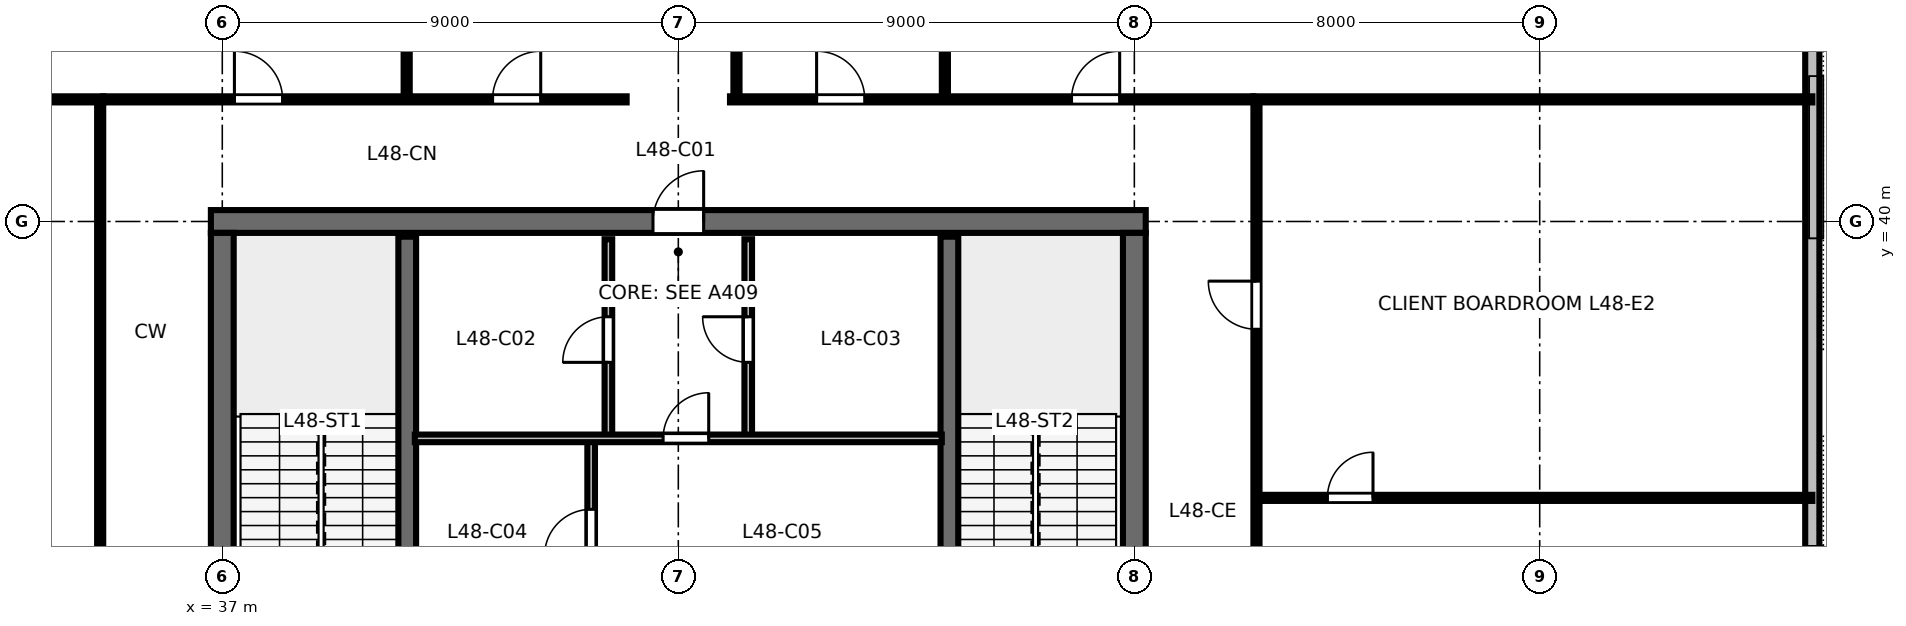
"""IFC4 building model, lengths in metres.
Left out: names, types, materials, properties, quantities, classifications, styles, units other than length and angle.
Written with IfcOpenShell. Run it as: python <this file> out.ifc"""

import sys

from ifc_helpers import new_model, si_unit, direction, frame, frame_2d, origin, place, context, subcontext, project, spatial, rectangle, extrude, element, fill, save


model = new_model("IFC4")
c1 = context("Model", 3, precision=1e-05, world=origin(), true_north=direction((0.0, 1.0)))
c2 = subcontext(c1, "Body", "Model", "MODEL_VIEW")
j1 = project(units=[si_unit("LENGTHUNIT", "METRE"), si_unit("PLANEANGLEUNIT", "RADIAN")], contexts=[c1])
p1 = place(None, origin())
s1 = spatial("IfcSite", under=j1, at=p1, CompositionType="ELEMENT")
p2 = place(p1, origin())
s2 = spatial("IfcBuilding", under=s1, at=p2, CompositionType="ELEMENT")
p3 = place(p2, frame((0.0, 0.0, 184.2)))
s3 = spatial("IfcBuildingStorey", under=s2, at=p3, CompositionType="ELEMENT", Elevation=184.2)
p4 = place(p3, frame((36.775, 40.0, 0.0), z_axis=(0.0, 0.0, 1.0), x_axis=(1.0, 0.0, 0.0)))
e1 = element("IfcWall", 1, at=p4, inside=s3, PredefinedType="SHEAR", context=c2, shape_type="SweptSolid", body=[
    extrude(rectangle(XDim=18.45, YDim=0.45, at=frame_2d((9.225, 0.0))), origin(), (0.0, 0.0, 1.0), 3.36),
])
p5 = place(p4, frame((8.725, 0.0, 0.0)))
e2 = element("IfcOpeningElement", 2, at=p5, cuts=e1, PredefinedType="OPENING", context=c2, shape_type="SweptSolid", body=[
    extrude(rectangle(XDim=1.0, YDim=2.15, at=frame_2d((0.5, 1.075))), frame((0.0, 0.235, 0.0), z_axis=(0.0, -1.0, 0.0), x_axis=(1.0, 0.0, 0.0)), (0.0, 0.0, 1.0), 0.47),
])
p6 = place(p3, frame((37.0, 24.225, 0.0), z_axis=(0.0, 0.0, 1.0), x_axis=(0.0, 1.0, 0.0)))
e3 = element("IfcWall", 3, at=p6, inside=s3, PredefinedType="SHEAR", context=c2, shape_type="SweptSolid", body=[
    extrude(rectangle(XDim=15.55, YDim=0.45, at=frame_2d((7.775, 0.0))), origin(), (0.0, 0.0, 1.0), 3.36),
])
p7 = place(p6, frame((5.3, 0.0, 0.0)))
e4 = element("IfcOpeningElement", 4, at=p7, cuts=e3, PredefinedType="OPENING", context=c2, shape_type="SweptSolid", body=[
    extrude(rectangle(XDim=1.15, YDim=2.15, at=frame_2d((0.575, 1.075))), frame((0.0, 0.235, 0.0), z_axis=(0.0, -1.0, 0.0), x_axis=(1.0, 0.0, 0.0)), (0.0, 0.0, 1.0), 0.47),
])
p8 = place(p3, frame((55.0, 24.225, 0.0), z_axis=(0.0, 0.0, 1.0), x_axis=(0.0, 1.0, 0.0)))
e5 = element("IfcWall", 5, at=p8, inside=s3, PredefinedType="SHEAR", context=c2, shape_type="SweptSolid", body=[
    extrude(rectangle(XDim=15.55, YDim=0.45, at=frame_2d((7.775, 0.0))), origin(), (0.0, 0.0, 1.0), 3.36),
])
p9 = place(p8, frame((5.3, 0.0, 0.0)))
e6 = element("IfcOpeningElement", 6, at=p9, cuts=e5, PredefinedType="OPENING", context=c2, shape_type="SweptSolid", body=[
    extrude(rectangle(XDim=1.15, YDim=2.15, at=frame_2d((0.575, 1.075))), frame((0.0, 0.235, 0.0), z_axis=(0.0, -1.0, 0.0), x_axis=(1.0, 0.0, 0.0)), (0.0, 0.0, 1.0), 0.47),
])
p10 = place(p3, frame((68.38, 17.2, 0.0), z_axis=(0.0, 0.0, 1.0), x_axis=(0.0, 1.0, 0.0)))
e7 = element("IfcWall", 7, at=p10, inside=s3, PredefinedType="STANDARD", context=c2, shape_type="SweptSolid", body=[
    extrude(rectangle(XDim=29.6, YDim=0.28, at=frame_2d((14.8, 0.0))), origin(), (0.0, 0.0, 1.0), 2.817),
])
for number, where, z_axis, x_axis in (
    (8, (40.65, 32.0, 0.0), (0.0, 0.0, 1.0), (0.0, 1.0, 0.0)),
    (9, (51.35, 32.0, 0.0), (0.0, 0.0, 1.0), (0.0, 1.0, 0.0)),
):
    element("IfcWall", number, at=place(p3, frame(where, z_axis=z_axis, x_axis=x_axis)), inside=s3, PredefinedType="SHEAR", context=c2, shape_type="SweptSolid", body=[
        extrude(rectangle(XDim=7.7, YDim=0.35, at=frame_2d((3.85, 0.0))), origin(), (0.0, 0.0, 1.0), 3.6),
    ])
p11 = place(p3, frame((44.62, 35.72, 0.0), z_axis=(0.0, 0.0, 1.0), x_axis=(0.0, 1.0, 0.0)))
e10 = element("IfcWall", 10, at=p11, inside=s3, PredefinedType="PARTITIONING", context=c2, shape_type="SweptSolid", body=[
    extrude(rectangle(XDim=3.93, YDim=0.15, at=frame_2d((1.965, 0.0))), origin(), (0.0, 0.0, 1.0), 3.36),
])
p12 = place(p11, frame((1.5, 0.0, 0.0)))
e11 = element("IfcOpeningElement", 11, at=p12, cuts=e10, PredefinedType="OPENING", context=c2, shape_type="SweptSolid", body=[
    extrude(rectangle(XDim=0.9, YDim=2.15, at=frame_2d((0.45, 1.075))), frame((0.0, 0.085, 0.0), z_axis=(0.0, -1.0, 0.0), x_axis=(1.0, 0.0, 0.0)), (0.0, 0.0, 1.0), 0.17),
])
p13 = place(p3, frame((47.38, 35.72, 0.0), z_axis=(0.0, 0.0, 1.0), x_axis=(0.0, 1.0, 0.0)))
e12 = element("IfcWall", 12, at=p13, inside=s3, PredefinedType="PARTITIONING", context=c2, shape_type="SweptSolid", body=[
    extrude(rectangle(XDim=3.93, YDim=0.15, at=frame_2d((1.965, 0.0))), origin(), (0.0, 0.0, 1.0), 3.36),
])
p14 = place(p13, frame((1.5, 0.0, 0.0)))
e13 = element("IfcOpeningElement", 13, at=p14, cuts=e12, PredefinedType="OPENING", context=c2, shape_type="SweptSolid", body=[
    extrude(rectangle(XDim=0.9, YDim=2.15, at=frame_2d((0.45, 1.075))), frame((0.0, 0.085, 0.0), z_axis=(0.0, -1.0, 0.0), x_axis=(1.0, 0.0, 0.0)), (0.0, 0.0, 1.0), 0.17),
])
p15 = place(p3, frame((44.28, 32.05, 0.0), z_axis=(0.0, 0.0, 1.0), x_axis=(0.0, 1.0, 0.0)))
e14 = element("IfcWall", 14, at=p15, inside=s3, PredefinedType="PARTITIONING", context=c2, shape_type="SweptSolid", body=[
    extrude(rectangle(XDim=3.67, YDim=0.15, at=frame_2d((1.835, 0.0))), origin(), (0.0, 0.0, 1.0), 3.36),
])
p16 = place(p15, frame((1.35, 0.0, 0.0)))
e15 = element("IfcOpeningElement", 15, at=p16, cuts=e14, PredefinedType="OPENING", context=c2, shape_type="SweptSolid", body=[
    extrude(rectangle(XDim=0.92, YDim=2.15, at=frame_2d((0.46, 1.075))), frame((0.0, 0.085, 0.0), z_axis=(0.0, -1.0, 0.0), x_axis=(1.0, 0.0, 0.0)), (0.0, 0.0, 1.0), 0.17),
])
p17 = place(p3, frame((40.8, 35.72, 0.0), z_axis=(0.0, 0.0, 1.0), x_axis=(1.0, 0.0, 0.0)))
e16 = element("IfcWall", 16, at=p17, inside=s3, PredefinedType="PARTITIONING", context=c2, shape_type="SweptSolid", body=[
    extrude(rectangle(XDim=10.4, YDim=0.15, at=frame_2d((5.2, 0.0))), origin(), (0.0, 0.0, 1.0), 3.36),
])
p18 = place(p17, frame((4.9, 0.0, 0.0)))
e17 = element("IfcOpeningElement", 17, at=p18, cuts=e16, PredefinedType="OPENING", context=c2, shape_type="SweptSolid", body=[
    extrude(rectangle(XDim=0.9, YDim=2.15, at=frame_2d((0.45, 1.075))), frame((0.0, 0.085, 0.0), z_axis=(0.0, -1.0, 0.0), x_axis=(1.0, 0.0, 0.0)), (0.0, 0.0, 1.0), 0.17),
])
p19 = place(p3, frame((40.639, 42.41, 0.0), z_axis=(0.0, 0.0, 1.0), x_axis=(0.0, 1.0, 0.0)))
e18 = element("IfcWall", 18, at=p19, inside=s3, PredefinedType="PARTITIONING", context=c2, shape_type="SweptSolid", body=[
    extrude(rectangle(XDim=9.33, YDim=0.12, at=frame_2d((4.665, 0.0))), origin(), (0.0, 0.0, 1.0), 2.64),
])
p20 = place(p19, frame((1.4, 0.0, 0.0)))
e19 = element("IfcOpeningElement", 19, at=p20, cuts=e18, PredefinedType="OPENING", context=c2, shape_type="SweptSolid", body=[
    extrude(rectangle(XDim=0.9, YDim=2.15, at=frame_2d((0.45, 1.075))), frame((0.0, 0.07, 0.0), z_axis=(0.0, -1.0, 0.0), x_axis=(1.0, 0.0, 0.0)), (0.0, 0.0, 1.0), 0.14),
])
p21 = place(p3, frame((47.148, 42.41, 0.0), z_axis=(0.0, 0.0, 1.0), x_axis=(0.0, 1.0, 0.0)))
e20 = element("IfcWall", 20, at=p21, inside=s3, PredefinedType="PARTITIONING", context=c2, shape_type="SweptSolid", body=[
    extrude(rectangle(XDim=9.33, YDim=0.12, at=frame_2d((4.665, 0.0))), origin(), (0.0, 0.0, 1.0), 2.64),
])
p22 = place(p21, frame((1.4, 0.0, 0.0)))
e21 = element("IfcOpeningElement", 21, at=p22, cuts=e20, PredefinedType="OPENING", context=c2, shape_type="SweptSolid", body=[
    extrude(rectangle(XDim=0.9, YDim=2.15, at=frame_2d((0.45, 1.075))), frame((0.0, 0.07, 0.0), z_axis=(0.0, -1.0, 0.0), x_axis=(1.0, 0.0, 0.0)), (0.0, 0.0, 1.0), 0.14),
])
p23 = place(p3, frame((51.261, 42.41, 0.0), z_axis=(0.0, 0.0, 1.0), x_axis=(0.0, 1.0, 0.0)))
e22 = element("IfcWall", 22, at=p23, inside=s3, PredefinedType="PARTITIONING", context=c2, shape_type="SweptSolid", body=[
    extrude(rectangle(XDim=9.33, YDim=0.12, at=frame_2d((4.665, 0.0))), origin(), (0.0, 0.0, 1.0), 2.64),
])
p24 = place(p23, frame((1.4, 0.0, 0.0)))
e23 = element("IfcOpeningElement", 23, at=p24, cuts=e22, PredefinedType="OPENING", context=c2, shape_type="SweptSolid", body=[
    extrude(rectangle(XDim=0.9, YDim=2.15, at=frame_2d((0.45, 1.075))), frame((0.0, 0.07, 0.0), z_axis=(0.0, -1.0, 0.0), x_axis=(1.0, 0.0, 0.0)), (0.0, 0.0, 1.0), 0.14),
])
p25 = place(p3, frame((34.65, 42.41, 0.0), z_axis=(0.0, 0.0, 1.0), x_axis=(1.0, 0.0, 0.0)))
e24 = element("IfcWall", 24, at=p25, inside=s3, PredefinedType="PARTITIONING", context=c2, shape_type="SweptSolid", body=[
    extrude(rectangle(XDim=10.33, YDim=0.12, at=frame_2d((5.165, 0.0))), origin(), (0.0, 0.0, 1.0), 2.64),
])
p26 = place(p25, frame((2.59, 0.0, 0.0)))
e25 = element("IfcOpeningElement", 25, at=p26, cuts=e24, PredefinedType="OPENING", context=c2, shape_type="SweptSolid", body=[
    extrude(rectangle(XDim=0.95, YDim=2.15, at=frame_2d((0.475, 1.075))), frame((0.0, 0.07, 0.0), z_axis=(0.0, -1.0, 0.0), x_axis=(1.0, 0.0, 0.0)), (0.0, 0.0, 1.0), 0.14),
])
p27 = place(p25, frame((7.685, 0.0, 0.0)))
e26 = element("IfcOpeningElement", 26, at=p27, cuts=e24, PredefinedType="OPENING", context=c2, shape_type="SweptSolid", body=[
    extrude(rectangle(XDim=0.95, YDim=2.15, at=frame_2d((0.475, 1.075))), frame((0.0, 0.07, 0.0), z_axis=(0.0, -1.0, 0.0), x_axis=(1.0, 0.0, 0.0)), (0.0, 0.0, 1.0), 0.14),
])
p28 = place(p3, frame((47.02, 42.41, 0.0), z_axis=(0.0, 0.0, 1.0), x_axis=(1.0, 0.0, 0.0)))
e27 = element("IfcWall", 27, at=p28, inside=s3, PredefinedType="PARTITIONING", context=c2, shape_type="SweptSolid", body=[
    extrude(rectangle(XDim=10.33, YDim=0.12, at=frame_2d((5.165, 0.0))), origin(), (0.0, 0.0, 1.0), 2.64),
])
p29 = place(p28, frame((1.709, 0.0, 0.0)))
e28 = element("IfcOpeningElement", 28, at=p29, cuts=e27, PredefinedType="OPENING", context=c2, shape_type="SweptSolid", body=[
    extrude(rectangle(XDim=0.95, YDim=2.15, at=frame_2d((0.475, 1.075))), frame((0.0, 0.07, 0.0), z_axis=(0.0, -1.0, 0.0), x_axis=(1.0, 0.0, 0.0)), (0.0, 0.0, 1.0), 0.14),
])
p30 = place(p28, frame((6.74, 0.0, 0.0)))
e29 = element("IfcOpeningElement", 29, at=p30, cuts=e27, PredefinedType="OPENING", context=c2, shape_type="SweptSolid", body=[
    extrude(rectangle(XDim=0.95, YDim=2.15, at=frame_2d((0.475, 1.075))), frame((0.0, 0.07, 0.0), z_axis=(0.0, -1.0, 0.0), x_axis=(1.0, 0.0, 0.0)), (0.0, 0.0, 1.0), 0.14),
])
p31 = place(p3, frame((34.59, 21.65, 0.0), z_axis=(0.0, 0.0, 1.0), x_axis=(0.0, 1.0, 0.0)))
e30 = element("IfcWall", 30, at=p31, inside=s3, PredefinedType="PARTITIONING", context=c2, shape_type="SweptSolid", body=[
    extrude(rectangle(XDim=20.7, YDim=0.12, at=frame_2d((10.35, 0.0))), origin(), (0.0, 0.0, 1.0), 2.64),
])
p32 = place(p31, frame((9.875, 0.0, 0.0)))
e31 = element("IfcOpeningElement", 31, at=p32, cuts=e30, PredefinedType="OPENING", context=c2, shape_type="SweptSolid", body=[
    extrude(rectangle(XDim=0.95, YDim=2.15, at=frame_2d((0.475, 1.075))), frame((0.0, 0.07, 0.0), z_axis=(0.0, -1.0, 0.0), x_axis=(1.0, 0.0, 0.0)), (0.0, 0.0, 1.0), 0.14),
])
p33 = place(p3, frame((57.41, 34.546, 0.0), z_axis=(0.0, 0.0, 1.0), x_axis=(1.0, 0.0, 0.0)))
e32 = element("IfcWall", 32, at=p33, inside=s3, PredefinedType="PARTITIONING", context=c2, shape_type="SweptSolid", body=[
    extrude(rectangle(XDim=10.97, YDim=0.12, at=frame_2d((5.485, 0.0))), origin(), (0.0, 0.0, 1.0), 2.64),
])
p34 = place(p33, frame((1.4, 0.0, 0.0)))
e33 = element("IfcOpeningElement", 33, at=p34, cuts=e32, PredefinedType="OPENING", context=c2, shape_type="SweptSolid", body=[
    extrude(rectangle(XDim=0.9, YDim=2.15, at=frame_2d((0.45, 1.075))), frame((0.0, 0.07, 0.0), z_axis=(0.0, -1.0, 0.0), x_axis=(1.0, 0.0, 0.0)), (0.0, 0.0, 1.0), 0.14),
])
p35 = place(p3, frame((57.41, 21.65, 0.0), z_axis=(0.0, 0.0, 1.0), x_axis=(0.0, 1.0, 0.0)))
e34 = element("IfcWall", 34, at=p35, inside=s3, PredefinedType="PARTITIONING", context=c2, shape_type="SweptSolid", body=[
    extrude(rectangle(XDim=20.7, YDim=0.12, at=frame_2d((10.35, 0.0))), origin(), (0.0, 0.0, 1.0), 2.64),
])
p36 = place(p35, frame((6.073, 0.0, 0.0)))
e35 = element("IfcOpeningElement", 35, at=p36, cuts=e34, PredefinedType="OPENING", context=c2, shape_type="SweptSolid", body=[
    extrude(rectangle(XDim=0.95, YDim=2.15, at=frame_2d((0.475, 1.075))), frame((0.0, 0.07, 0.0), z_axis=(0.0, -1.0, 0.0), x_axis=(1.0, 0.0, 0.0)), (0.0, 0.0, 1.0), 0.14),
])
p37 = place(p35, frame((16.223, 0.0, 0.0)))
e36 = element("IfcOpeningElement", 36, at=p37, cuts=e34, PredefinedType="OPENING", context=c2, shape_type="SweptSolid", body=[
    extrude(rectangle(XDim=0.95, YDim=2.15, at=frame_2d((0.475, 1.075))), frame((0.0, 0.07, 0.0), z_axis=(0.0, -1.0, 0.0), x_axis=(1.0, 0.0, 0.0)), (0.0, 0.0, 1.0), 0.14),
])
for number, where, z_axis, x_axis in (
    (37, (34.65, 42.41, 0.0), (0.0, 0.0, 1.0), (-1.0, 0.0, 0.0)),
    (38, (57.35, 42.41, 0.0), (0.0, 0.0, 1.0), (1.0, 0.0, 0.0)),
):
    element("IfcWall", number, at=place(p3, frame(where, z_axis=z_axis, x_axis=x_axis)), inside=s3, PredefinedType="PARTITIONING", context=c2, shape_type="SweptSolid", body=[
        extrude(rectangle(XDim=11.03, YDim=0.12, at=frame_2d((5.515, 0.0))), origin(), (0.0, 0.0, 1.0), 2.64),
    ])
p38 = place(p5, origin())
e39 = element("IfcDoor", 39, at=p38, inside=s3, OperationType="SINGLE_SWING_RIGHT", PredefinedType="DOOR", context=c2, shape_type="SweptSolid", body=[
    extrude(rectangle(XDim=1.0, YDim=2.15, at=frame_2d((0.5, 1.075))), frame((0.0, 0.025, 0.0), z_axis=(0.0, -1.0, 0.0), x_axis=(1.0, 0.0, 0.0)), (0.0, 0.0, 1.0), 0.05),
])
fill(e2, e39)
p39 = place(p12, origin())
e40 = element("IfcDoor", 40, at=p39, inside=s3, OperationType="SINGLE_SWING_LEFT", PredefinedType="DOOR", context=c2, shape_type="SweptSolid", body=[
    extrude(rectangle(XDim=0.9, YDim=2.15, at=frame_2d((0.45, 1.075))), frame((0.0, 0.025, 0.0), z_axis=(0.0, -1.0, 0.0), x_axis=(1.0, 0.0, 0.0)), (0.0, 0.0, 1.0), 0.05),
])
fill(e11, e40)
p40 = place(p14, origin())
e41 = element("IfcDoor", 41, at=p40, inside=s3, OperationType="SINGLE_SWING_RIGHT", PredefinedType="DOOR", context=c2, shape_type="SweptSolid", body=[
    extrude(rectangle(XDim=0.9, YDim=2.15, at=frame_2d((0.45, 1.075))), frame((0.0, 0.025, 0.0), z_axis=(0.0, -1.0, 0.0), x_axis=(1.0, 0.0, 0.0)), (0.0, 0.0, 1.0), 0.05),
])
fill(e13, e41)
p41 = place(p16, origin())
e42 = element("IfcDoor", 42, at=p41, inside=s3, OperationType="SINGLE_SWING_LEFT", PredefinedType="DOOR", context=c2, shape_type="SweptSolid", body=[
    extrude(rectangle(XDim=0.92, YDim=2.15, at=frame_2d((0.46, 1.075))), frame((0.0, 0.025, 0.0), z_axis=(0.0, -1.0, 0.0), x_axis=(1.0, 0.0, 0.0)), (0.0, 0.0, 1.0), 0.05),
])
fill(e15, e42)
p42 = place(p18, origin())
e43 = element("IfcDoor", 43, at=p42, inside=s3, OperationType="SINGLE_SWING_RIGHT", PredefinedType="DOOR", context=c2, shape_type="SweptSolid", body=[
    extrude(rectangle(XDim=0.9, YDim=2.15, at=frame_2d((0.45, 1.075))), frame((0.0, 0.025, 0.0), z_axis=(0.0, -1.0, 0.0), x_axis=(1.0, 0.0, 0.0)), (0.0, 0.0, 1.0), 0.05),
])
fill(e17, e43)
p43 = place(p26, origin())
e44 = element("IfcDoor", 44, at=p43, inside=s3, OperationType="SINGLE_SWING_LEFT", PredefinedType="DOOR", context=c2, shape_type="SweptSolid", body=[
    extrude(rectangle(XDim=0.95, YDim=2.15, at=frame_2d((0.475, 1.075))), frame((0.0, 0.025, 0.0), z_axis=(0.0, -1.0, 0.0), x_axis=(1.0, 0.0, 0.0)), (0.0, 0.0, 1.0), 0.05),
])
fill(e25, e44)
p44 = place(p27, origin())
e45 = element("IfcDoor", 45, at=p44, inside=s3, OperationType="SINGLE_SWING_RIGHT", PredefinedType="DOOR", context=c2, shape_type="SweptSolid", body=[
    extrude(rectangle(XDim=0.95, YDim=2.15, at=frame_2d((0.475, 1.075))), frame((0.0, 0.025, 0.0), z_axis=(0.0, -1.0, 0.0), x_axis=(1.0, 0.0, 0.0)), (0.0, 0.0, 1.0), 0.05),
])
fill(e26, e45)
p45 = place(p29, origin())
e46 = element("IfcDoor", 46, at=p45, inside=s3, OperationType="SINGLE_SWING_LEFT", PredefinedType="DOOR", context=c2, shape_type="SweptSolid", body=[
    extrude(rectangle(XDim=0.95, YDim=2.15, at=frame_2d((0.475, 1.075))), frame((0.0, 0.025, 0.0), z_axis=(0.0, -1.0, 0.0), x_axis=(1.0, 0.0, 0.0)), (0.0, 0.0, 1.0), 0.05),
])
fill(e28, e46)
p46 = place(p30, origin())
e47 = element("IfcDoor", 47, at=p46, inside=s3, OperationType="SINGLE_SWING_RIGHT", PredefinedType="DOOR", context=c2, shape_type="SweptSolid", body=[
    extrude(rectangle(XDim=0.95, YDim=2.15, at=frame_2d((0.475, 1.075))), frame((0.0, 0.025, 0.0), z_axis=(0.0, -1.0, 0.0), x_axis=(1.0, 0.0, 0.0)), (0.0, 0.0, 1.0), 0.05),
])
fill(e29, e47)
p47 = place(p34, origin())
e48 = element("IfcDoor", 48, at=p47, inside=s3, OperationType="SINGLE_SWING_RIGHT", PredefinedType="DOOR", context=c2, shape_type="SweptSolid", body=[
    extrude(rectangle(XDim=0.9, YDim=2.15, at=frame_2d((0.45, 1.075))), frame((0.0, 0.025, 0.0), z_axis=(0.0, -1.0, 0.0), x_axis=(1.0, 0.0, 0.0)), (0.0, 0.0, 1.0), 0.05),
])
fill(e33, e48)
p48 = place(p37, origin())
e49 = element("IfcDoor", 49, at=p48, inside=s3, OperationType="SINGLE_SWING_RIGHT", PredefinedType="DOOR", context=c2, shape_type="SweptSolid", body=[
    extrude(rectangle(XDim=0.95, YDim=2.15, at=frame_2d((0.475, 1.075))), frame((0.0, 0.025, 0.0), z_axis=(0.0, -1.0, 0.0), x_axis=(1.0, 0.0, 0.0)), (0.0, 0.0, 1.0), 0.05),
])
fill(e36, e49)
save(model, sys.argv[1])
